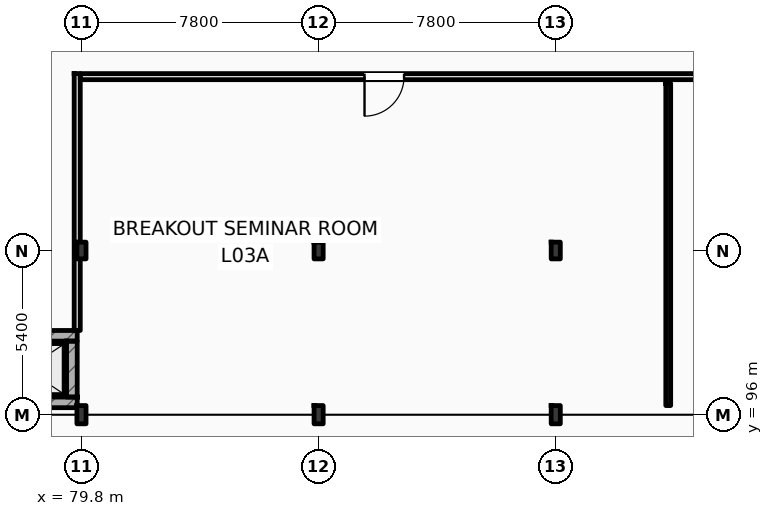
"""IFC4 building model, lengths in metres.
Left out: names, types, materials, properties, quantities, classifications, styles, units other than length and angle.
Written with IfcOpenShell. Run it as: python <this file> out.ifc"""

import sys

from ifc_helpers import new_model, si_unit, direction, frame, frame_2d, origin, origin_2d, place, context, subcontext, project, spatial, rectangle, i_section, extrude, element, fill, save


model = new_model("IFC4")
c1 = context("Model", 3, precision=1e-05, world=origin(), true_north=direction((0.0, 1.0)))
c2 = subcontext(c1, "Body", "Model", "MODEL_VIEW")
j1 = project(units=[si_unit("LENGTHUNIT", "METRE"), si_unit("PLANEANGLEUNIT", "RADIAN")], contexts=[c1])
p1 = place(None, origin())
s1 = spatial("IfcSite", under=j1, at=p1, CompositionType="ELEMENT")
p2 = place(p1, origin())
s2 = spatial("IfcBuilding", under=s1, at=p2, CompositionType="ELEMENT")
p3 = place(p2, frame((0.0, 0.0, 16.2)))
s3 = spatial("IfcBuildingStorey", under=s2, at=p3, CompositionType="ELEMENT", Elevation=16.2)
p4 = place(p3, frame((79.8, 96.0, 0.0), z_axis=(0.0, 0.0, 1.0), x_axis=(1.0, 0.0, 0.0)))
e1 = element("IfcColumn", 1, at=p4, inside=s3, PredefinedType="COLUMN", context=c2, shape_type="SweptSolid", body=[
    extrude(i_section(OverallWidth=0.3, OverallDepth=0.6, WebThickness=0.015, FlangeThickness=0.03, FilletRadius=0.027, at=origin_2d()), origin(), (0.0, 0.0, 1.0), 4.2),
])
p5 = place(p3, frame((79.8, 101.4, 0.0), z_axis=(0.0, 0.0, 1.0), x_axis=(1.0, 0.0, 0.0)))
e2 = element("IfcColumn", 2, at=p5, inside=s3, PredefinedType="COLUMN", context=c2, shape_type="SweptSolid", body=[
    extrude(i_section(OverallWidth=0.3, OverallDepth=0.55, WebThickness=0.015, FlangeThickness=0.029, FilletRadius=0.027, at=origin_2d()), origin(), (0.0, 0.0, 1.0), 4.2),
])
p6 = place(p3, frame((87.6, 96.0, 0.0), z_axis=(0.0, 0.0, 1.0), x_axis=(1.0, 0.0, 0.0)))
e3 = element("IfcColumn", 3, at=p6, inside=s3, PredefinedType="COLUMN", context=c2, shape_type="SweptSolid", body=[
    extrude(i_section(OverallWidth=0.3, OverallDepth=0.6, WebThickness=0.015, FlangeThickness=0.03, FilletRadius=0.027, at=origin_2d()), origin(), (0.0, 0.0, 1.0), 4.2),
])
p7 = place(p3, frame((87.6, 101.4, 0.0), z_axis=(0.0, 0.0, 1.0), x_axis=(1.0, 0.0, 0.0)))
e4 = element("IfcColumn", 4, at=p7, inside=s3, PredefinedType="COLUMN", context=c2, shape_type="SweptSolid", body=[
    extrude(i_section(OverallWidth=0.3, OverallDepth=0.55, WebThickness=0.015, FlangeThickness=0.029, FilletRadius=0.027, at=origin_2d()), origin(), (0.0, 0.0, 1.0), 4.2),
])
p8 = place(p3, frame((95.4, 96.0, 0.0), z_axis=(0.0, 0.0, 1.0), x_axis=(1.0, 0.0, 0.0)))
e5 = element("IfcColumn", 5, at=p8, inside=s3, PredefinedType="COLUMN", context=c2, shape_type="SweptSolid", body=[
    extrude(i_section(OverallWidth=0.3, OverallDepth=0.6, WebThickness=0.015, FlangeThickness=0.03, FilletRadius=0.027, at=origin_2d()), origin(), (0.0, 0.0, 1.0), 4.2),
])
p9 = place(p3, frame((95.4, 101.4, 0.0), z_axis=(0.0, 0.0, 1.0), x_axis=(1.0, 0.0, 0.0)))
e6 = element("IfcColumn", 6, at=p9, inside=s3, PredefinedType="COLUMN", context=c2, shape_type="SweptSolid", body=[
    extrude(i_section(OverallWidth=0.3, OverallDepth=0.55, WebThickness=0.015, FlangeThickness=0.029, FilletRadius=0.027, at=origin_2d()), origin(), (0.0, 0.0, 1.0), 4.2),
])
p10 = place(p3, frame((76.67, 98.595, 0.0), z_axis=(0.0, 0.0, 1.0), x_axis=(1.0, 0.0, 0.0)))
e7 = element("IfcWall", 7, at=p10, inside=s3, PredefinedType="SHEAR", context=c2, shape_type="SweptSolid", body=[
    extrude(rectangle(XDim=2.99, YDim=0.35, at=frame_2d((1.495, 0.0))), origin(), (0.0, 0.0, 1.0), 3.92),
])
p11 = place(p10, frame((0.695, 0.0, 0.0)))
e8 = element("IfcOpeningElement", 8, at=p11, cuts=e7, PredefinedType="OPENING", context=c2, shape_type="SweptSolid", body=[
    extrude(rectangle(XDim=1.25, YDim=2.25, at=frame_2d((0.625, 1.125))), frame((0.0, 0.185, 0.0), z_axis=(0.0, -1.0, 0.0), x_axis=(1.0, 0.0, 0.0)), (0.0, 0.0, 1.0), 0.37),
])
p12 = place(p3, frame((76.67, 96.405, 0.0), z_axis=(0.0, 0.0, 1.0), x_axis=(1.0, 0.0, 0.0)))
e9 = element("IfcWall", 9, at=p12, inside=s3, PredefinedType="SHEAR", context=c2, shape_type="SweptSolid", body=[
    extrude(rectangle(XDim=2.99, YDim=0.35, at=frame_2d((1.495, 0.0))), origin(), (0.0, 0.0, 1.0), 3.92),
])
p13 = place(p3, frame((79.485, 96.58, 0.0), z_axis=(0.0, 0.0, 1.0), x_axis=(0.0, 1.0, 0.0)))
e10 = element("IfcWall", 10, at=p13, inside=s3, PredefinedType="SHEAR", context=c2, shape_type="SweptSolid", body=[
    extrude(rectangle(XDim=1.84, YDim=0.35, at=frame_2d((0.92, 0.0))), origin(), (0.0, 0.0, 1.0), 3.51),
])
p14 = place(p3, frame((79.76, 107.12, 0.0), z_axis=(0.0, 0.0, 1.0), x_axis=(1.0, 0.0, 0.0)))
e11 = element("IfcWall", 11, at=p14, inside=s3, PredefinedType="PARTITIONING", context=c2, shape_type="SweptSolid", body=[
    extrude(rectangle(XDim=40.1, YDim=0.2, at=frame_2d((20.05, 0.0))), origin(), (0.0, 0.0, 1.0), 3.92),
])
p15 = place(p14, frame((9.35, 0.0, 0.0)))
e12 = element("IfcOpeningElement", 12, at=p15, cuts=e11, PredefinedType="OPENING", context=c2, shape_type="SweptSolid", body=[
    extrude(rectangle(XDim=1.3, YDim=2.2, at=frame_2d((0.65, 1.1))), frame((0.0, 0.11, 0.0), z_axis=(0.0, -1.0, 0.0), x_axis=(1.0, 0.0, 0.0)), (0.0, 0.0, 1.0), 0.22),
])
p16 = place(p14, frame((28.85, 0.0, 0.0)))
e13 = element("IfcOpeningElement", 13, at=p16, cuts=e11, PredefinedType="OPENING", context=c2, shape_type="SweptSolid", body=[
    extrude(rectangle(XDim=1.3, YDim=2.2, at=frame_2d((0.65, 1.1))), frame((0.0, 0.11, 0.0), z_axis=(0.0, -1.0, 0.0), x_axis=(1.0, 0.0, 0.0)), (0.0, 0.0, 1.0), 0.22),
])
p17 = place(p3, frame((79.66, 98.77, 0.0), z_axis=(0.0, 0.0, 1.0), x_axis=(0.0, 1.0, 0.0)))
e14 = element("IfcWall", 14, at=p17, inside=s3, PredefinedType="PARTITIONING", context=c2, shape_type="SweptSolid", body=[
    extrude(rectangle(XDim=8.45, YDim=0.2, at=frame_2d((4.225, 0.0))), origin(), (0.0, 0.0, 1.0), 3.51),
])
p18 = place(p3, frame((99.1, 96.3, 0.0), z_axis=(0.0, 0.0, 1.0), x_axis=(0.0, 1.0, 0.0)))
e15 = element("IfcWall", 15, at=p18, inside=s3, PredefinedType="PARTITIONING", context=c2, shape_type="SweptSolid", body=[
    extrude(rectangle(XDim=10.6, YDim=0.16, at=frame_2d((5.3, 0.0))), origin(), (0.0, 0.0, 1.0), 3.92),
])
p19 = place(p15, frame((1.3, 0.0, 0.0), z_axis=(0.0, 0.0, 1.0), x_axis=(-1.0, 0.0, 0.0)))
e16 = element("IfcDoor", 16, at=p19, inside=s3, OperationType="SINGLE_SWING_LEFT", PredefinedType="DOOR", context=c2, shape_type="SweptSolid", body=[
    extrude(rectangle(XDim=1.3, YDim=2.2, at=frame_2d((0.65, 1.1))), frame((0.0, 0.025, 0.0), z_axis=(0.0, -1.0, 0.0), x_axis=(1.0, 0.0, 0.0)), (0.0, 0.0, 1.0), 0.05),
])
fill(e12, e16)
save(model, sys.argv[1])
